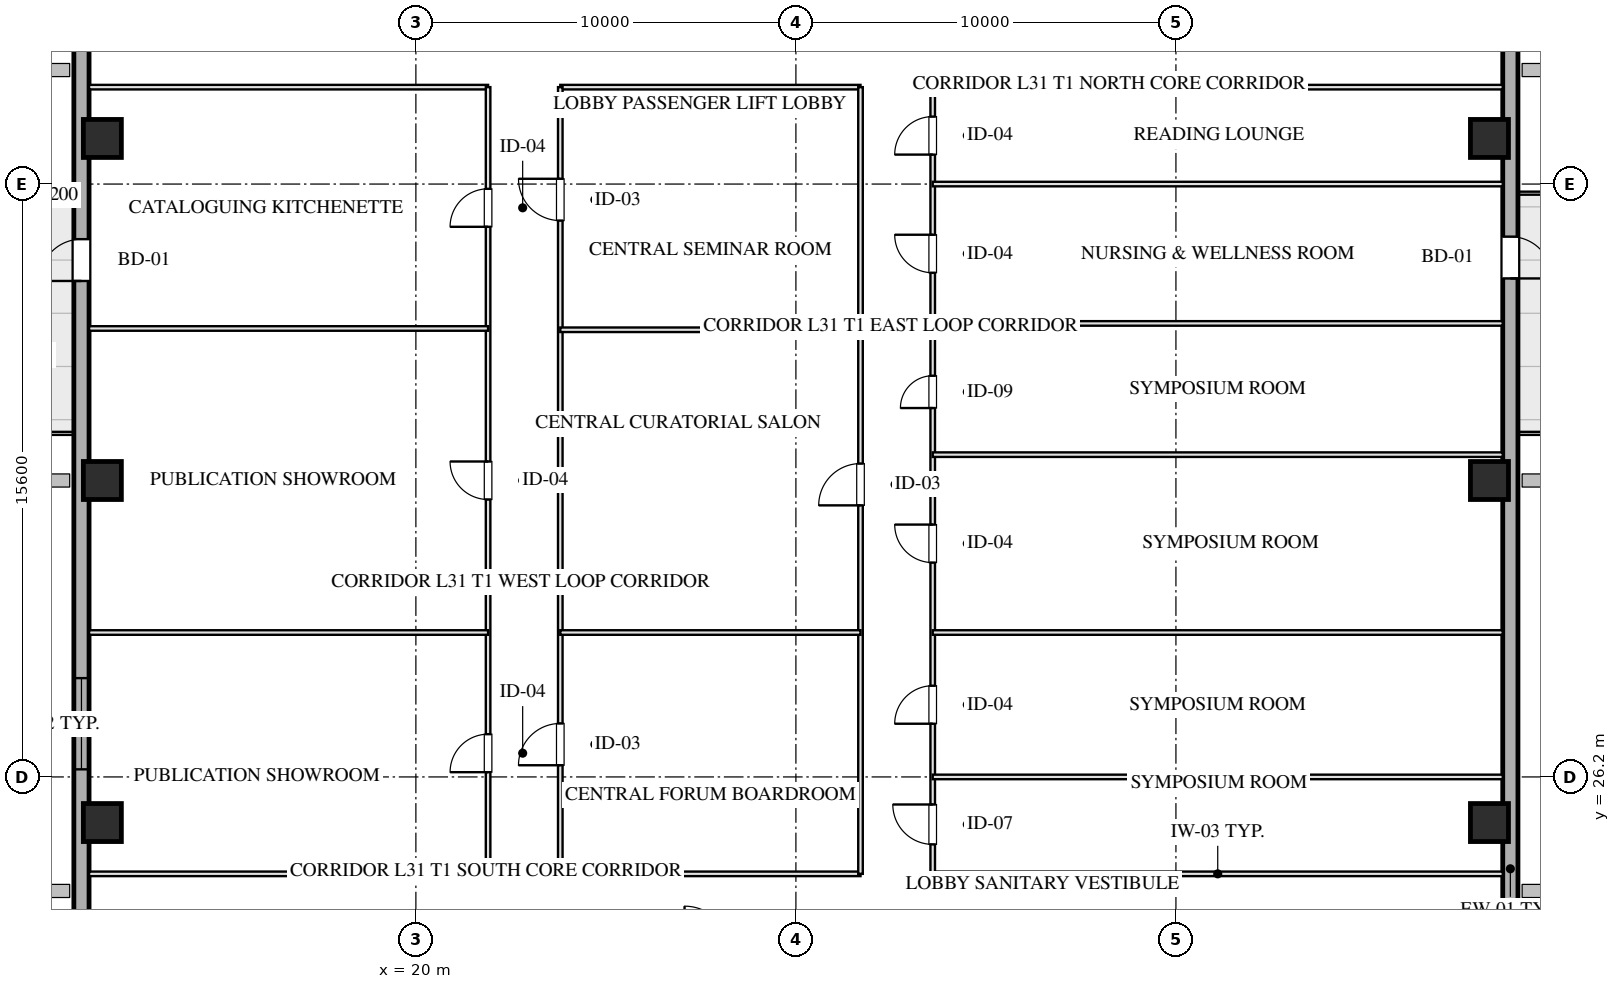
"""IFC4 building model, lengths in metres.
Left out: names, types, materials, properties, quantities, classifications, styles, units other than length and angle.
Written with IfcOpenShell. Run it as: python <this file> out.ifc"""

import sys

from ifc_helpers import new_model, si_unit, direction, frame, frame_2d, origin, origin_2d, place, context, subcontext, project, spatial, rectangle, hollow_rectangle, extrude, element, fill, save


model = new_model("IFC4")
c1 = context("Model", 3, precision=1e-05, world=origin(), true_north=direction((0.0, 1.0)))
c2 = subcontext(c1, "Body", "Model", "MODEL_VIEW")
j1 = project(units=[si_unit("LENGTHUNIT", "METRE"), si_unit("PLANEANGLEUNIT", "RADIAN")], contexts=[c1])
p1 = place(None, origin())
s1 = spatial("IfcSite", under=j1, at=p1, CompositionType="ELEMENT")
p2 = place(p1, origin())
s2 = spatial("IfcBuilding", under=s1, at=p2, CompositionType="ELEMENT")
p3 = place(p2, frame((0.0, 0.0, 120.75)))
s3 = spatial("IfcBuildingStorey", under=s2, at=p3, CompositionType="ELEMENT", Elevation=120.75)
for number, where, z_axis, x_axis in (
    (1, (11.75, 25.0, 0.0), (0.0, 0.0, 1.0), (1.0, 0.0, 0.0)),
    (2, (11.75, 34.0, 0.0), (0.0, 0.0, 1.0), (1.0, 0.0, 0.0)),
    (3, (11.75, 43.0, 0.0), (0.0, 0.0, 1.0), (1.0, 0.0, 0.0)),
    (4, (48.25, 25.0, 0.0), (0.0, 0.0, 1.0), (1.0, 0.0, 0.0)),
    (5, (48.25, 34.0, 0.0), (0.0, 0.0, 1.0), (1.0, 0.0, 0.0)),
    (6, (48.25, 43.0, 0.0), (0.0, 0.0, 1.0), (1.0, 0.0, 0.0)),
):
    element("IfcColumn", number, at=place(p3, frame(where, z_axis=z_axis, x_axis=x_axis)), inside=s3, PredefinedType="COLUMN", context=c2, shape_type="SweptSolid", body=[
        extrude(hollow_rectangle(XDim=1.0, YDim=1.0, WallThickness=0.036, at=origin_2d()), origin(), (0.0, 0.0, 1.0), 3.451),
    ])
p4 = place(p3, frame((11.2, 9.0, 0.0), z_axis=(0.0, 0.0, 1.0), x_axis=(0.0, 1.0, 0.0)))
e7 = element("IfcWall", 7, at=p4, inside=s3, PredefinedType="SOLIDWALL", context=c2, shape_type="SweptSolid", body=[
    extrude(rectangle(XDim=50.0, YDim=0.4, at=frame_2d((25.0, 0.0))), origin(), (0.0, 0.0, 1.0), 2.61),
])
p5 = place(p4, frame((17.4, 0.0, 0.75)))
e8 = element("IfcOpeningElement", 8, at=p5, cuts=e7, PredefinedType="OPENING", context=c2, shape_type="SweptSolid", body=[
    extrude(rectangle(XDim=2.4, YDim=1.46, at=frame_2d((1.2, 0.73))), frame((0.0, 0.21, 0.0), z_axis=(0.0, -1.0, 0.0), x_axis=(1.0, 0.0, 0.0)), (0.0, 0.0, 1.0), 0.42),
])
p6 = place(p4, frame((30.25, 0.0, 0.0)))
e9 = element("IfcOpeningElement", 9, at=p6, cuts=e7, PredefinedType="OPENING", context=c2, shape_type="SweptSolid", body=[
    extrude(rectangle(XDim=1.1, YDim=2.15, at=frame_2d((0.55, 1.075))), frame((0.0, 0.21, 0.0), z_axis=(0.0, -1.0, 0.0), x_axis=(1.0, 0.0, 0.0)), (0.0, 0.0, 1.0), 0.42),
])
p7 = place(p3, frame((48.8, 59.0, 0.0), z_axis=(0.0, 0.0, 1.0), x_axis=(0.0, -1.0, 0.0)))
e10 = element("IfcWall", 10, at=p7, inside=s3, PredefinedType="SOLIDWALL", context=c2, shape_type="SweptSolid", body=[
    extrude(rectangle(XDim=50.0, YDim=0.4, at=frame_2d((25.0, 0.0))), origin(), (0.0, 0.0, 1.0), 2.61),
])
p8 = place(p7, frame((18.583, 0.0, 0.0)))
e11 = element("IfcOpeningElement", 11, at=p8, cuts=e10, PredefinedType="OPENING", context=c2, shape_type="SweptSolid", body=[
    extrude(rectangle(XDim=1.1, YDim=2.15, at=frame_2d((0.55, 1.075))), frame((0.0, 0.21, 0.0), z_axis=(0.0, -1.0, 0.0), x_axis=(1.0, 0.0, 0.0)), (0.0, 0.0, 1.0), 0.42),
])
p9 = place(p3, frame((11.4, 23.65, 0.0), z_axis=(0.0, 0.0, 1.0), x_axis=(1.0, 0.0, 0.0)))
e12 = element("IfcWall", 12, at=p9, inside=s3, PredefinedType="PARTITIONING", context=c2, shape_type="SweptSolid", body=[
    extrude(rectangle(XDim=10.5, YDim=0.12, at=frame_2d((5.25, 0.0))), origin(), (0.0, 0.0, 1.0), 3.175),
])
p10 = place(p3, frame((23.8, 23.65, 0.0), z_axis=(0.0, 0.0, 1.0), x_axis=(1.0, 0.0, 0.0)))
e13 = element("IfcWall", 13, at=p10, inside=s3, PredefinedType="PARTITIONING", context=c2, shape_type="SweptSolid", body=[
    extrude(rectangle(XDim=7.9, YDim=0.12, at=frame_2d((3.95, 0.0))), origin(), (0.0, 0.0, 1.0), 3.175),
])
p11 = place(p3, frame((33.6, 23.65, 0.0), z_axis=(0.0, 0.0, 1.0), x_axis=(1.0, 0.0, 0.0)))
e14 = element("IfcWall", 14, at=p11, inside=s3, PredefinedType="PARTITIONING", context=c2, shape_type="SweptSolid", body=[
    extrude(rectangle(XDim=15.0, YDim=0.12, at=frame_2d((7.5, 0.0))), origin(), (0.0, 0.0, 1.0), 3.175),
])
p12 = place(p3, frame((11.4, 44.35, 0.0), z_axis=(0.0, 0.0, 1.0), x_axis=(1.0, 0.0, 0.0)))
e15 = element("IfcWall", 15, at=p12, inside=s3, PredefinedType="PARTITIONING", context=c2, shape_type="SweptSolid", body=[
    extrude(rectangle(XDim=10.5, YDim=0.12, at=frame_2d((5.25, 0.0))), origin(), (0.0, 0.0, 1.0), 3.175),
])
p13 = place(p3, frame((23.8, 44.35, 0.0), z_axis=(0.0, 0.0, 1.0), x_axis=(1.0, 0.0, 0.0)))
e16 = element("IfcWall", 16, at=p13, inside=s3, PredefinedType="PARTITIONING", context=c2, shape_type="SweptSolid", body=[
    extrude(rectangle(XDim=7.9, YDim=0.12, at=frame_2d((3.95, 0.0))), origin(), (0.0, 0.0, 1.0), 3.175),
])
p14 = place(p3, frame((33.6, 44.35, 0.0), z_axis=(0.0, 0.0, 1.0), x_axis=(1.0, 0.0, 0.0)))
e17 = element("IfcWall", 17, at=p14, inside=s3, PredefinedType="PARTITIONING", context=c2, shape_type="SweptSolid", body=[
    extrude(rectangle(XDim=15.0, YDim=0.12, at=frame_2d((7.5, 0.0))), origin(), (0.0, 0.0, 1.0), 3.175),
])
p15 = place(p3, frame((21.9, 23.65, 0.0), z_axis=(0.0, 0.0, 1.0), x_axis=(0.0, 1.0, 0.0)))
e18 = element("IfcWall", 18, at=p15, inside=s3, PredefinedType="PARTITIONING", context=c2, shape_type="SweptSolid", body=[
    extrude(rectangle(XDim=20.7, YDim=0.12, at=frame_2d((10.35, 0.0))), origin(), (0.0, 0.0, 1.0), 3.175),
])
p16 = place(p15, frame((2.675, 0.0, 0.0)))
e19 = element("IfcOpeningElement", 19, at=p16, cuts=e18, PredefinedType="OPENING", context=c2, shape_type="SweptSolid", body=[
    extrude(rectangle(XDim=1.0, YDim=2.05, at=frame_2d((0.5, 1.025))), frame((0.0, 0.07, 0.0), z_axis=(0.0, -1.0, 0.0), x_axis=(1.0, 0.0, 0.0)), (0.0, 0.0, 1.0), 0.14),
])
p17 = place(p15, frame((9.85, 0.0, 0.0)))
e20 = element("IfcOpeningElement", 20, at=p17, cuts=e18, PredefinedType="OPENING", context=c2, shape_type="SweptSolid", body=[
    extrude(rectangle(XDim=1.0, YDim=2.05, at=frame_2d((0.5, 1.025))), frame((0.0, 0.07, 0.0), z_axis=(0.0, -1.0, 0.0), x_axis=(1.0, 0.0, 0.0)), (0.0, 0.0, 1.0), 0.14),
])
p18 = place(p15, frame((17.025, 0.0, 0.0)))
e21 = element("IfcOpeningElement", 21, at=p18, cuts=e18, PredefinedType="OPENING", context=c2, shape_type="SweptSolid", body=[
    extrude(rectangle(XDim=1.0, YDim=2.05, at=frame_2d((0.5, 1.025))), frame((0.0, 0.07, 0.0), z_axis=(0.0, -1.0, 0.0), x_axis=(1.0, 0.0, 0.0)), (0.0, 0.0, 1.0), 0.14),
])
p19 = place(p3, frame((23.8, 23.65, 0.0), z_axis=(0.0, 0.0, 1.0), x_axis=(0.0, 1.0, 0.0)))
e22 = element("IfcWall", 22, at=p19, inside=s3, PredefinedType="PARTITIONING", context=c2, shape_type="SweptSolid", body=[
    extrude(rectangle(XDim=20.7, YDim=0.12, at=frame_2d((10.35, 0.0))), origin(), (0.0, 0.0, 1.0), 3.175),
])
p20 = place(p19, frame((2.857, 0.0, 0.0)))
e23 = element("IfcOpeningElement", 23, at=p20, cuts=e22, PredefinedType="OPENING", context=c2, shape_type="SweptSolid", body=[
    extrude(rectangle(XDim=1.1, YDim=2.05, at=frame_2d((0.55, 1.025))), frame((0.0, 0.07, 0.0), z_axis=(0.0, -1.0, 0.0), x_axis=(1.0, 0.0, 0.0)), (0.0, 0.0, 1.0), 0.14),
])
p21 = place(p19, frame((17.189, 0.0, 0.0)))
e24 = element("IfcOpeningElement", 24, at=p21, cuts=e22, PredefinedType="OPENING", context=c2, shape_type="SweptSolid", body=[
    extrude(rectangle(XDim=1.1, YDim=2.05, at=frame_2d((0.55, 1.025))), frame((0.0, 0.07, 0.0), z_axis=(0.0, -1.0, 0.0), x_axis=(1.0, 0.0, 0.0)), (0.0, 0.0, 1.0), 0.14),
])
p22 = place(p3, frame((31.7, 23.65, 0.0), z_axis=(0.0, 0.0, 1.0), x_axis=(0.0, 1.0, 0.0)))
e25 = element("IfcWall", 25, at=p22, inside=s3, PredefinedType="PARTITIONING", context=c2, shape_type="SweptSolid", body=[
    extrude(rectangle(XDim=20.7, YDim=0.12, at=frame_2d((10.35, 0.0))), origin(), (0.0, 0.0, 1.0), 3.175),
])
p23 = place(p22, frame((9.696, 0.0, 0.0)))
e26 = element("IfcOpeningElement", 26, at=p23, cuts=e25, PredefinedType="OPENING", context=c2, shape_type="SweptSolid", body=[
    extrude(rectangle(XDim=1.1, YDim=2.05, at=frame_2d((0.55, 1.025))), frame((0.0, 0.07, 0.0), z_axis=(0.0, -1.0, 0.0), x_axis=(1.0, 0.0, 0.0)), (0.0, 0.0, 1.0), 0.14),
])
p24 = place(p3, frame((33.6, 23.65, 0.0), z_axis=(0.0, 0.0, 1.0), x_axis=(0.0, 1.0, 0.0)))
e27 = element("IfcWall", 27, at=p24, inside=s3, PredefinedType="PARTITIONING", context=c2, shape_type="SweptSolid", body=[
    extrude(rectangle(XDim=20.7, YDim=0.12, at=frame_2d((10.35, 0.0))), origin(), (0.0, 0.0, 1.0), 3.175),
])
p25 = place(p24, frame((0.775, 0.0, 0.0)))
e28 = element("IfcOpeningElement", 28, at=p25, cuts=e27, PredefinedType="OPENING", context=c2, shape_type="SweptSolid", body=[
    extrude(rectangle(XDim=1.05, YDim=2.05, at=frame_2d((0.525, 1.025))), frame((0.0, 0.07, 0.0), z_axis=(0.0, -1.0, 0.0), x_axis=(1.0, 0.0, 0.0)), (0.0, 0.0, 1.0), 0.14),
])
p26 = place(p24, frame((3.95, 0.0, 0.0)))
e29 = element("IfcOpeningElement", 29, at=p26, cuts=e27, PredefinedType="OPENING", context=c2, shape_type="SweptSolid", body=[
    extrude(rectangle(XDim=1.0, YDim=2.05, at=frame_2d((0.5, 1.025))), frame((0.0, 0.07, 0.0), z_axis=(0.0, -1.0, 0.0), x_axis=(1.0, 0.0, 0.0)), (0.0, 0.0, 1.0), 0.14),
])
p27 = place(p24, frame((8.19, 0.0, 0.0)))
e30 = element("IfcOpeningElement", 30, at=p27, cuts=e27, PredefinedType="OPENING", context=c2, shape_type="SweptSolid", body=[
    extrude(rectangle(XDim=1.0, YDim=2.05, at=frame_2d((0.5, 1.025))), frame((0.0, 0.07, 0.0), z_axis=(0.0, -1.0, 0.0), x_axis=(1.0, 0.0, 0.0)), (0.0, 0.0, 1.0), 0.14),
])
p28 = place(p24, frame((12.257, 0.0, 0.0)))
e31 = element("IfcOpeningElement", 31, at=p28, cuts=e27, PredefinedType="OPENING", context=c2, shape_type="SweptSolid", body=[
    extrude(rectangle(XDim=0.85, YDim=2.05, at=frame_2d((0.425, 1.025))), frame((0.0, 0.07, 0.0), z_axis=(0.0, -1.0, 0.0), x_axis=(1.0, 0.0, 0.0)), (0.0, 0.0, 1.0), 0.14),
])
p29 = place(p24, frame((15.816, 0.0, 0.0)))
e32 = element("IfcOpeningElement", 32, at=p29, cuts=e27, PredefinedType="OPENING", context=c2, shape_type="SweptSolid", body=[
    extrude(rectangle(XDim=1.0, YDim=2.05, at=frame_2d((0.5, 1.025))), frame((0.0, 0.07, 0.0), z_axis=(0.0, -1.0, 0.0), x_axis=(1.0, 0.0, 0.0)), (0.0, 0.0, 1.0), 0.14),
])
p30 = place(p24, frame((18.925, 0.0, 0.0)))
e33 = element("IfcOpeningElement", 33, at=p30, cuts=e27, PredefinedType="OPENING", context=c2, shape_type="SweptSolid", body=[
    extrude(rectangle(XDim=1.0, YDim=2.05, at=frame_2d((0.5, 1.025))), frame((0.0, 0.07, 0.0), z_axis=(0.0, -1.0, 0.0), x_axis=(1.0, 0.0, 0.0)), (0.0, 0.0, 1.0), 0.14),
])
for number, where, z_axis, x_axis in (
    (34, (23.8, 30.0, 0.0), (0.0, 0.0, 1.0), (1.0, 0.0, 0.0)),
    (35, (23.8, 37.966, 0.0), (0.0, 0.0, 1.0), (1.0, 0.0, 0.0)),
):
    element("IfcWall", number, at=place(p3, frame(where, z_axis=z_axis, x_axis=x_axis)), inside=s3, PredefinedType="PARTITIONING", context=c2, shape_type="SweptSolid", body=[
        extrude(rectangle(XDim=7.9, YDim=0.12, at=frame_2d((3.95, 0.0))), origin(), (0.0, 0.0, 1.0), 3.175),
    ])
for number, where, z_axis, x_axis in (
    (36, (11.4, 30.0, 0.0), (0.0, 0.0, 1.0), (1.0, 0.0, 0.0)),
    (37, (11.4, 38.0, 0.0), (0.0, 0.0, 1.0), (1.0, 0.0, 0.0)),
):
    element("IfcWall", number, at=place(p3, frame(where, z_axis=z_axis, x_axis=x_axis)), inside=s3, PredefinedType="PARTITIONING", context=c2, shape_type="SweptSolid", body=[
        extrude(rectangle(XDim=10.5, YDim=0.12, at=frame_2d((5.25, 0.0))), origin(), (0.0, 0.0, 1.0), 3.175),
    ])
for number, where, z_axis, x_axis in (
    (38, (33.6, 26.2, 0.0), (0.0, 0.0, 1.0), (1.0, 0.0, 0.0)),
    (39, (33.6, 30.0, 0.0), (0.0, 0.0, 1.0), (1.0, 0.0, 0.0)),
    (40, (33.6, 34.68, 0.0), (0.0, 0.0, 1.0), (1.0, 0.0, 0.0)),
    (41, (33.6, 38.133, 0.0), (0.0, 0.0, 1.0), (1.0, 0.0, 0.0)),
    (42, (33.6, 41.8, 0.0), (0.0, 0.0, 1.0), (1.0, 0.0, 0.0)),
):
    element("IfcWall", number, at=place(p3, frame(where, z_axis=z_axis, x_axis=x_axis)), inside=s3, PredefinedType="PARTITIONING", context=c2, shape_type="SweptSolid", body=[
        extrude(rectangle(XDim=15.0, YDim=0.12, at=frame_2d((7.5, 0.0))), origin(), (0.0, 0.0, 1.0), 3.175),
    ])
p31 = place(p5, origin())
e43 = element("IfcWindow", 43, at=p31, inside=s3, PartitioningType="TRIPLE_PANEL_VERTICAL", PredefinedType="WINDOW", context=c2, shape_type="SweptSolid", body=[
    extrude(rectangle(XDim=2.4, YDim=1.46, at=frame_2d((1.2, 0.73))), frame((0.0, 0.03, 0.0), z_axis=(0.0, -1.0, 0.0), x_axis=(1.0, 0.0, 0.0)), (0.0, 0.0, 1.0), 0.06),
])
fill(e8, e43)
p32 = place(p6, origin())
e44 = element("IfcDoor", 44, at=p32, inside=s3, OperationType="SINGLE_SWING_LEFT", PredefinedType="DOOR", context=c2, shape_type="SweptSolid", body=[
    extrude(rectangle(XDim=1.1, YDim=2.15, at=frame_2d((0.55, 1.075))), frame((0.0, 0.025, 0.0), z_axis=(0.0, -1.0, 0.0), x_axis=(1.0, 0.0, 0.0)), (0.0, 0.0, 1.0), 0.05),
])
fill(e9, e44)
p33 = place(p8, origin())
e45 = element("IfcDoor", 45, at=p33, inside=s3, OperationType="SINGLE_SWING_RIGHT", PredefinedType="DOOR", context=c2, shape_type="SweptSolid", body=[
    extrude(rectangle(XDim=1.1, YDim=2.15, at=frame_2d((0.55, 1.075))), frame((0.0, 0.025, 0.0), z_axis=(0.0, -1.0, 0.0), x_axis=(1.0, 0.0, 0.0)), (0.0, 0.0, 1.0), 0.05),
])
fill(e11, e45)
p34 = place(p16, origin())
e46 = element("IfcDoor", 46, at=p34, inside=s3, OperationType="SINGLE_SWING_LEFT", PredefinedType="DOOR", context=c2, shape_type="SweptSolid", body=[
    extrude(rectangle(XDim=1.0, YDim=2.05, at=frame_2d((0.5, 1.025))), frame((0.0, 0.025, 0.0), z_axis=(0.0, -1.0, 0.0), x_axis=(1.0, 0.0, 0.0)), (0.0, 0.0, 1.0), 0.05),
])
fill(e19, e46)
p35 = place(p17, origin())
e47 = element("IfcDoor", 47, at=p35, inside=s3, OperationType="SINGLE_SWING_RIGHT", PredefinedType="DOOR", context=c2, shape_type="SweptSolid", body=[
    extrude(rectangle(XDim=1.0, YDim=2.05, at=frame_2d((0.5, 1.025))), frame((0.0, 0.025, 0.0), z_axis=(0.0, -1.0, 0.0), x_axis=(1.0, 0.0, 0.0)), (0.0, 0.0, 1.0), 0.05),
])
fill(e20, e47)
p36 = place(p18, origin())
e48 = element("IfcDoor", 48, at=p36, inside=s3, OperationType="SINGLE_SWING_LEFT", PredefinedType="DOOR", context=c2, shape_type="SweptSolid", body=[
    extrude(rectangle(XDim=1.0, YDim=2.05, at=frame_2d((0.5, 1.025))), frame((0.0, 0.025, 0.0), z_axis=(0.0, -1.0, 0.0), x_axis=(1.0, 0.0, 0.0)), (0.0, 0.0, 1.0), 0.05),
])
fill(e21, e48)
p37 = place(p20, origin())
e49 = element("IfcDoor", 49, at=p37, inside=s3, OperationType="SINGLE_SWING_LEFT", PredefinedType="DOOR", context=c2, shape_type="SweptSolid", body=[
    extrude(rectangle(XDim=1.1, YDim=2.05, at=frame_2d((0.55, 1.025))), frame((0.0, 0.025, 0.0), z_axis=(0.0, -1.0, 0.0), x_axis=(1.0, 0.0, 0.0)), (0.0, 0.0, 1.0), 0.05),
])
fill(e23, e49)
p38 = place(p21, origin())
e50 = element("IfcDoor", 50, at=p38, inside=s3, OperationType="SINGLE_SWING_RIGHT", PredefinedType="DOOR", context=c2, shape_type="SweptSolid", body=[
    extrude(rectangle(XDim=1.1, YDim=2.05, at=frame_2d((0.55, 1.025))), frame((0.0, 0.025, 0.0), z_axis=(0.0, -1.0, 0.0), x_axis=(1.0, 0.0, 0.0)), (0.0, 0.0, 1.0), 0.05),
])
fill(e24, e50)
p39 = place(p23, origin())
e51 = element("IfcDoor", 51, at=p39, inside=s3, OperationType="SINGLE_SWING_LEFT", PredefinedType="DOOR", context=c2, shape_type="SweptSolid", body=[
    extrude(rectangle(XDim=1.1, YDim=2.05, at=frame_2d((0.55, 1.025))), frame((0.0, 0.025, 0.0), z_axis=(0.0, -1.0, 0.0), x_axis=(1.0, 0.0, 0.0)), (0.0, 0.0, 1.0), 0.05),
])
fill(e26, e51)
p40 = place(p25, origin())
e52 = element("IfcDoor", 52, at=p40, inside=s3, OperationType="SINGLE_SWING_RIGHT", PredefinedType="DOOR", context=c2, shape_type="SweptSolid", body=[
    extrude(rectangle(XDim=1.05, YDim=2.05, at=frame_2d((0.525, 1.025))), frame((0.0, 0.025, 0.0), z_axis=(0.0, -1.0, 0.0), x_axis=(1.0, 0.0, 0.0)), (0.0, 0.0, 1.0), 0.05),
])
fill(e28, e52)
p41 = place(p26, origin())
e53 = element("IfcDoor", 53, at=p41, inside=s3, OperationType="SINGLE_SWING_LEFT", PredefinedType="DOOR", context=c2, shape_type="SweptSolid", body=[
    extrude(rectangle(XDim=1.0, YDim=2.05, at=frame_2d((0.5, 1.025))), frame((0.0, 0.025, 0.0), z_axis=(0.0, -1.0, 0.0), x_axis=(1.0, 0.0, 0.0)), (0.0, 0.0, 1.0), 0.05),
])
fill(e29, e53)
p42 = place(p27, origin())
e54 = element("IfcDoor", 54, at=p42, inside=s3, OperationType="SINGLE_SWING_RIGHT", PredefinedType="DOOR", context=c2, shape_type="SweptSolid", body=[
    extrude(rectangle(XDim=1.0, YDim=2.05, at=frame_2d((0.5, 1.025))), frame((0.0, 0.025, 0.0), z_axis=(0.0, -1.0, 0.0), x_axis=(1.0, 0.0, 0.0)), (0.0, 0.0, 1.0), 0.05),
])
fill(e30, e54)
p43 = place(p28, origin())
e55 = element("IfcDoor", 55, at=p43, inside=s3, OperationType="SINGLE_SWING_LEFT", PredefinedType="DOOR", context=c2, shape_type="SweptSolid", body=[
    extrude(rectangle(XDim=0.85, YDim=2.05, at=frame_2d((0.425, 1.025))), frame((0.0, 0.025, 0.0), z_axis=(0.0, -1.0, 0.0), x_axis=(1.0, 0.0, 0.0)), (0.0, 0.0, 1.0), 0.05),
])
fill(e31, e55)
p44 = place(p29, origin())
e56 = element("IfcDoor", 56, at=p44, inside=s3, OperationType="SINGLE_SWING_RIGHT", PredefinedType="DOOR", context=c2, shape_type="SweptSolid", body=[
    extrude(rectangle(XDim=1.0, YDim=2.05, at=frame_2d((0.5, 1.025))), frame((0.0, 0.025, 0.0), z_axis=(0.0, -1.0, 0.0), x_axis=(1.0, 0.0, 0.0)), (0.0, 0.0, 1.0), 0.05),
])
fill(e32, e56)
p45 = place(p30, origin())
e57 = element("IfcDoor", 57, at=p45, inside=s3, OperationType="SINGLE_SWING_LEFT", PredefinedType="DOOR", context=c2, shape_type="SweptSolid", body=[
    extrude(rectangle(XDim=1.0, YDim=2.05, at=frame_2d((0.5, 1.025))), frame((0.0, 0.025, 0.0), z_axis=(0.0, -1.0, 0.0), x_axis=(1.0, 0.0, 0.0)), (0.0, 0.0, 1.0), 0.05),
])
fill(e33, e57)
save(model, sys.argv[1])
